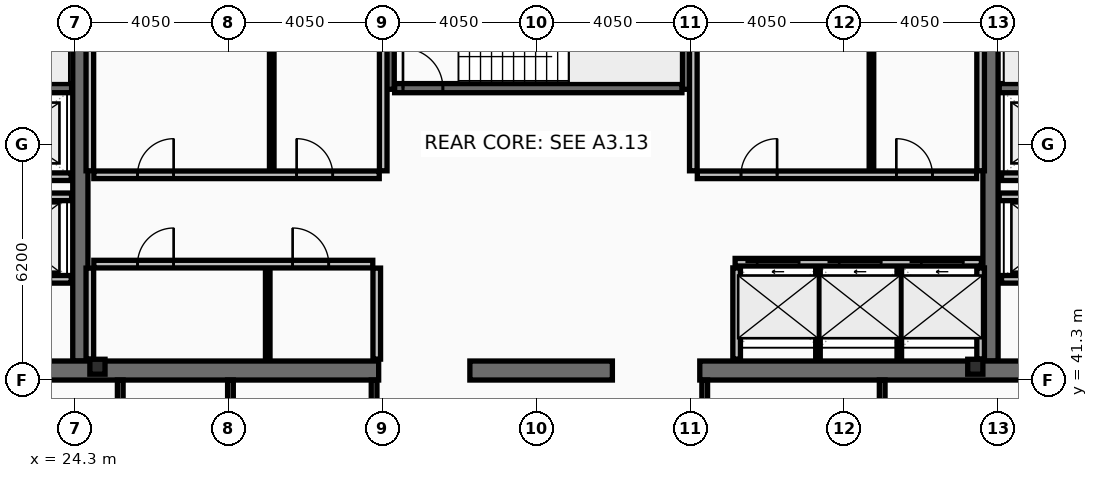
"""IFC4 building model, lengths in metres.
Left out: names, types, materials, properties, quantities, classifications, styles, units other than length and angle.
Written with IfcOpenShell. Run it as: python <this file> out.ifc"""

import sys

from ifc_helpers import new_model, si_unit, direction, frame, frame_2d, origin, origin_2d, place, context, subcontext, project, spatial, rectangle, i_section, extrude, element, fill, save


model = new_model("IFC4")
c1 = context("Model", 3, precision=1e-05, world=origin(), true_north=direction((0.0, 1.0)))
c2 = subcontext(c1, "Body", "Model", "MODEL_VIEW")
j1 = project(units=[si_unit("LENGTHUNIT", "METRE"), si_unit("PLANEANGLEUNIT", "RADIAN")], contexts=[c1])
p1 = place(None, origin())
s1 = spatial("IfcSite", under=j1, at=p1, CompositionType="ELEMENT")
p2 = place(p1, origin())
s2 = spatial("IfcBuilding", under=s1, at=p2, CompositionType="ELEMENT")
p3 = place(p2, frame((0.0, 0.0, 277.0)))
s3 = spatial("IfcBuildingStorey", under=s2, at=p3, CompositionType="ELEMENT", Elevation=277.0)
for number, where, z_axis, x_axis in (
    (1, (24.45, 41.8, 0.0), (0.0, 0.0, 1.0), (0.0, 1.0, 0.0)),
    (2, (48.4, 41.8, 0.0), (0.0, 0.0, 1.0), (0.0, 1.0, 0.0)),
):
    element("IfcWall", number, at=place(p3, frame(where, z_axis=z_axis, x_axis=x_axis)), inside=s3, PredefinedType="SHEAR", context=c2, shape_type="SweptSolid", body=[
        extrude(rectangle(XDim=11.4, YDim=0.4, at=frame_2d((5.7, 0.0))), origin(), (0.0, 0.0, 1.0), 3.44),
    ])
p4 = place(p3, frame((32.3, 41.55, 0.0), z_axis=(0.0, 0.0, 1.0), x_axis=(-1.0, 0.0, 0.0)))
e3 = element("IfcWall", 3, at=p4, inside=s3, PredefinedType="SHEAR", context=c2, shape_type="SweptSolid", body=[
    extrude(rectangle(XDim=11.45, YDim=0.5, at=frame_2d((5.725, 0.0))), origin(), (0.0, 0.0, 1.0), 3.44),
])
p5 = place(p3, frame((38.45, 41.55, 0.0), z_axis=(0.0, 0.0, 1.0), x_axis=(-1.0, 0.0, 0.0)))
e4 = element("IfcWall", 4, at=p5, inside=s3, PredefinedType="SHEAR", context=c2, shape_type="SweptSolid", body=[
    extrude(rectangle(XDim=3.75, YDim=0.5, at=frame_2d((1.875, 0.0))), origin(), (0.0, 0.0, 1.0), 3.44),
])
p6 = place(p3, frame((52.05, 41.55, 0.0), z_axis=(0.0, 0.0, 1.0), x_axis=(-1.0, 0.0, 0.0)))
e5 = element("IfcWall", 5, at=p6, inside=s3, PredefinedType="SHEAR", context=c2, shape_type="SweptSolid", body=[
    extrude(rectangle(XDim=11.3, YDim=0.5, at=frame_2d((5.65, 0.0))), origin(), (0.0, 0.0, 1.0), 3.44),
])
for number, where, z_axis, x_axis in (
    (6, (32.58, 48.95, 0.0), (0.0, 0.0, 1.0), (0.0, 1.0, 0.0)),
    (7, (40.42, 48.95, 0.0), (0.0, 0.0, 1.0), (0.0, 1.0, 0.0)),
):
    element("IfcWall", number, at=place(p3, frame(where, z_axis=z_axis, x_axis=x_axis)), inside=s3, PredefinedType="SHEAR", context=c2, shape_type="SweptSolid", body=[
        extrude(rectangle(XDim=4.25, YDim=0.26, at=frame_2d((2.125, 0.0))), origin(), (0.0, 0.0, 1.0), 3.44),
    ])
p7 = place(p3, frame((16.7, 48.98, 0.0), z_axis=(0.0, 0.0, 1.0), x_axis=(1.0, 0.0, 0.0)))
e8 = element("IfcWall", 8, at=p7, inside=s3, PredefinedType="SHEAR", context=c2, shape_type="SweptSolid", body=[
    extrude(rectangle(XDim=7.52, YDim=0.24, at=frame_2d((3.76, 0.0))), origin(), (0.0, 0.0, 1.0), 3.44),
])
p8 = place(p7, frame((0.22, 0.0, 0.0)))
e9 = element("IfcOpeningElement", 9, at=p8, cuts=e8, PredefinedType="OPENING", context=c2, shape_type="SweptSolid", body=[
    extrude(rectangle(XDim=1.05, YDim=2.15, at=frame_2d((0.525, 1.075))), frame((0.0, 0.13, 0.0), z_axis=(0.0, -1.0, 0.0), x_axis=(1.0, 0.0, 0.0)), (0.0, 0.0, 1.0), 0.26),
])
p9 = place(p3, frame((48.63, 48.98, 0.0), z_axis=(0.0, 0.0, 1.0), x_axis=(1.0, 0.0, 0.0)))
e10 = element("IfcWall", 10, at=p9, inside=s3, PredefinedType="SHEAR", context=c2, shape_type="SweptSolid", body=[
    extrude(rectangle(XDim=7.57, YDim=0.24, at=frame_2d((3.785, 0.0))), origin(), (0.0, 0.0, 1.0), 3.44),
])
p10 = place(p9, frame((6.3, 0.0, 0.0)))
e11 = element("IfcOpeningElement", 11, at=p10, cuts=e10, PredefinedType="OPENING", context=c2, shape_type="SweptSolid", body=[
    extrude(rectangle(XDim=1.05, YDim=2.15, at=frame_2d((0.525, 1.075))), frame((0.0, 0.13, 0.0), z_axis=(0.0, -1.0, 0.0), x_axis=(1.0, 0.0, 0.0)), (0.0, 0.0, 1.0), 0.26),
])
p11 = place(p3, frame((32.72, 48.98, 0.0), z_axis=(0.0, 0.0, 1.0), x_axis=(1.0, 0.0, 0.0)))
e12 = element("IfcWall", 12, at=p11, inside=s3, PredefinedType="SHEAR", context=c2, shape_type="SweptSolid", body=[
    extrude(rectangle(XDim=7.56, YDim=0.24, at=frame_2d((3.78, 0.0))), origin(), (0.0, 0.0, 1.0), 3.44),
])
p12 = place(p11, frame((0.22, 0.0, 0.0)))
e13 = element("IfcOpeningElement", 13, at=p12, cuts=e12, PredefinedType="OPENING", context=c2, shape_type="SweptSolid", body=[
    extrude(rectangle(XDim=1.05, YDim=2.15, at=frame_2d((0.525, 1.075))), frame((0.0, 0.13, 0.0), z_axis=(0.0, -1.0, 0.0), x_axis=(1.0, 0.0, 0.0)), (0.0, 0.0, 1.0), 0.26),
])
for number, where, z_axis, x_axis in (
    (14, (24.9, 41.65, 0.0), (0.0, 0.0, 1.0), (1.0, 0.0, 0.0)),
    (15, (48.0, 41.65, 0.0), (0.0, 0.0, 1.0), (1.0, 0.0, 0.0)),
):
    element("IfcColumn", number, at=place(p3, frame(where, z_axis=z_axis, x_axis=x_axis)), inside=s3, PredefinedType="COLUMN", context=c2, shape_type="SweptSolid", body=[
        extrude(i_section(OverallWidth=0.399, OverallDepth=0.393, WebThickness=0.023, FlangeThickness=0.037, at=origin_2d()), origin(), (0.0, 0.0, 1.0), 3.6),
    ])
p13 = place(p3, frame((41.68, 44.4, 0.0), z_axis=(0.0, 0.0, 1.0), x_axis=(1.0, 0.0, 0.0)))
e16 = element("IfcWall", 16, at=p13, inside=s3, PredefinedType="PARTITIONING", context=c2, shape_type="SweptSolid", body=[
    extrude(rectangle(XDim=6.48, YDim=0.2, at=frame_2d((3.24, 0.0))), origin(), (0.0, 0.0, 1.0), 3.44),
])
p14 = place(p13, frame((0.58, 0.0, 0.0)))
e17 = element("IfcOpeningElement", 17, at=p14, cuts=e16, PredefinedType="OPENING", context=c2, shape_type="SweptSolid", body=[
    extrude(rectangle(XDim=1.1, YDim=2.18, at=frame_2d((0.55, 1.09))), frame((0.0, 0.11, 0.0), z_axis=(0.0, -1.0, 0.0), x_axis=(1.0, 0.0, 0.0)), (0.0, 0.0, 1.0), 0.22),
])
p15 = place(p13, frame((2.74, 0.0, 0.0)))
e18 = element("IfcOpeningElement", 18, at=p15, cuts=e16, PredefinedType="OPENING", context=c2, shape_type="SweptSolid", body=[
    extrude(rectangle(XDim=1.1, YDim=2.18, at=frame_2d((0.55, 1.09))), frame((0.0, 0.11, 0.0), z_axis=(0.0, -1.0, 0.0), x_axis=(1.0, 0.0, 0.0)), (0.0, 0.0, 1.0), 0.22),
])
p16 = place(p13, frame((4.9, 0.0, 0.0)))
e19 = element("IfcOpeningElement", 19, at=p16, cuts=e16, PredefinedType="OPENING", context=c2, shape_type="SweptSolid", body=[
    extrude(rectangle(XDim=1.1, YDim=2.18, at=frame_2d((0.55, 1.09))), frame((0.0, 0.11, 0.0), z_axis=(0.0, -1.0, 0.0), x_axis=(1.0, 0.0, 0.0)), (0.0, 0.0, 1.0), 0.22),
])
p17 = place(p3, frame((51.61, 43.95, 0.0), z_axis=(0.0, 0.0, 1.0), x_axis=(-1.0, 0.0, 0.0)))
e20 = element("IfcWall", 20, at=p17, inside=s3, PredefinedType="PARTITIONING", context=c2, shape_type="SweptSolid", body=[
    extrude(rectangle(XDim=2.92, YDim=0.2, at=frame_2d((1.46, 0.0))), origin(), (0.0, 0.0, 1.0), 3.44),
])
p18 = place(p17, frame((0.81, 0.0, 0.0)))
e21 = element("IfcOpeningElement", 21, at=p18, cuts=e20, PredefinedType="OPENING", context=c2, shape_type="SweptSolid", body=[
    extrude(rectangle(XDim=1.3, YDim=2.18, at=frame_2d((0.65, 1.09))), frame((0.0, 0.11, 0.0), z_axis=(0.0, -1.0, 0.0), x_axis=(1.0, 0.0, 0.0)), (0.0, 0.0, 1.0), 0.22),
])
p19 = place(p3, frame((24.21, 43.95, 0.0), z_axis=(0.0, 0.0, 1.0), x_axis=(-1.0, 0.0, 0.0)))
e22 = element("IfcWall", 22, at=p19, inside=s3, PredefinedType="PARTITIONING", context=c2, shape_type="SweptSolid", body=[
    extrude(rectangle(XDim=2.97, YDim=0.2, at=frame_2d((1.485, 0.0))), origin(), (0.0, 0.0, 1.0), 3.44),
])
p20 = place(p19, frame((0.86, 0.0, 0.0)))
e23 = element("IfcOpeningElement", 23, at=p20, cuts=e22, PredefinedType="OPENING", context=c2, shape_type="SweptSolid", body=[
    extrude(rectangle(XDim=1.3, YDim=2.18, at=frame_2d((0.65, 1.09))), frame((0.0, 0.11, 0.0), z_axis=(0.0, -1.0, 0.0), x_axis=(1.0, 0.0, 0.0)), (0.0, 0.0, 1.0), 0.22),
])
p21 = place(p3, frame((51.61, 46.65, 0.0), z_axis=(0.0, 0.0, 1.0), x_axis=(-1.0, 0.0, 0.0)))
e24 = element("IfcWall", 24, at=p21, inside=s3, PredefinedType="PARTITIONING", context=c2, shape_type="SweptSolid", body=[
    extrude(rectangle(XDim=2.92, YDim=0.2, at=frame_2d((1.46, 0.0))), origin(), (0.0, 0.0, 1.0), 3.44),
])
p22 = place(p21, frame((0.86, 0.0, 0.0)))
e25 = element("IfcOpeningElement", 25, at=p22, cuts=e24, PredefinedType="OPENING", context=c2, shape_type="SweptSolid", body=[
    extrude(rectangle(XDim=1.2, YDim=2.18, at=frame_2d((0.6, 1.09))), frame((0.0, 0.11, 0.0), z_axis=(0.0, -1.0, 0.0), x_axis=(1.0, 0.0, 0.0)), (0.0, 0.0, 1.0), 0.22),
])
p23 = place(p3, frame((24.21, 46.65, 0.0), z_axis=(0.0, 0.0, 1.0), x_axis=(-1.0, 0.0, 0.0)))
e26 = element("IfcWall", 26, at=p23, inside=s3, PredefinedType="PARTITIONING", context=c2, shape_type="SweptSolid", body=[
    extrude(rectangle(XDim=2.97, YDim=0.2, at=frame_2d((1.485, 0.0))), origin(), (0.0, 0.0, 1.0), 3.44),
])
p24 = place(p23, frame((0.91, 0.0, 0.0)))
e27 = element("IfcOpeningElement", 27, at=p24, cuts=e26, PredefinedType="OPENING", context=c2, shape_type="SweptSolid", body=[
    extrude(rectangle(XDim=1.2, YDim=2.18, at=frame_2d((0.6, 1.09))), frame((0.0, 0.11, 0.0), z_axis=(0.0, -1.0, 0.0), x_axis=(1.0, 0.0, 0.0)), (0.0, 0.0, 1.0), 0.22),
])
p25 = place(p3, frame((21.2, 46.12, 0.0), z_axis=(0.0, 0.0, 1.0), x_axis=(1.0, 0.0, 0.0)))
e28 = element("IfcWall", 28, at=p25, inside=s3, PredefinedType="PARTITIONING", context=c2, shape_type="SweptSolid", body=[
    extrude(rectangle(XDim=3.02, YDim=0.2, at=frame_2d((1.51, 0.0))), origin(), (0.0, 0.0, 1.0), 3.44),
])
p26 = place(p3, frame((48.63, 46.12, 0.0), z_axis=(0.0, 0.0, 1.0), x_axis=(1.0, 0.0, 0.0)))
e29 = element("IfcWall", 29, at=p26, inside=s3, PredefinedType="PARTITIONING", context=c2, shape_type="SweptSolid", body=[
    extrude(rectangle(XDim=3.07, YDim=0.2, at=frame_2d((1.535, 0.0))), origin(), (0.0, 0.0, 1.0), 3.44),
])
for number, where, z_axis, x_axis in (
    (30, (24.7, 46.805, 0.0), (0.0, 0.0, 1.0), (0.0, 1.0, 0.0)),
    (31, (32.42, 46.805, 0.0), (0.0, 0.0, 1.0), (0.0, 1.0, 0.0)),
):
    element("IfcWall", number, at=place(p3, frame(where, z_axis=z_axis, x_axis=x_axis)), inside=s3, PredefinedType="PARTITIONING", context=c2, shape_type="SweptSolid", body=[
        extrude(rectangle(XDim=5.99, YDim=0.2, at=frame_2d((2.995, 0.0))), origin(), (0.0, 0.0, 1.0), 3.44),
    ])
p27 = place(p3, frame((29.486, 46.805, 0.0), z_axis=(0.0, 0.0, 1.0), x_axis=(0.0, 1.0, 0.0)))
e32 = element("IfcWall", 32, at=p27, inside=s3, PredefinedType="PARTITIONING", context=c2, shape_type="SweptSolid", body=[
    extrude(rectangle(XDim=5.99, YDim=0.12, at=frame_2d((2.995, 0.0))), origin(), (0.0, 0.0, 1.0), 3.44),
])
p28 = place(p3, frame((24.805, 46.7, 0.0), z_axis=(0.0, 0.0, 1.0), x_axis=(1.0, 0.0, 0.0)))
e33 = element("IfcWall", 33, at=p28, inside=s3, PredefinedType="PARTITIONING", context=c2, shape_type="SweptSolid", body=[
    extrude(rectangle(XDim=7.51, YDim=0.2, at=frame_2d((3.755, 0.0))), origin(), (0.0, 0.0, 1.0), 3.44),
])
p29 = place(p28, frame((1.15, 0.0, 0.0)))
e34 = element("IfcOpeningElement", 34, at=p29, cuts=e33, PredefinedType="OPENING", context=c2, shape_type="SweptSolid", body=[
    extrude(rectangle(XDim=0.95, YDim=2.1, at=frame_2d((0.475, 1.05))), frame((0.0, 0.11, 0.0), z_axis=(0.0, -1.0, 0.0), x_axis=(1.0, 0.0, 0.0)), (0.0, 0.0, 1.0), 0.22),
])
p30 = place(p28, frame((5.336, 0.0, 0.0)))
e35 = element("IfcOpeningElement", 35, at=p30, cuts=e33, PredefinedType="OPENING", context=c2, shape_type="SweptSolid", body=[
    extrude(rectangle(XDim=0.95, YDim=2.1, at=frame_2d((0.475, 1.05))), frame((0.0, 0.11, 0.0), z_axis=(0.0, -1.0, 0.0), x_axis=(1.0, 0.0, 0.0)), (0.0, 0.0, 1.0), 0.22),
])
for number, where, z_axis, x_axis in (
    (36, (24.7, 41.85, 0.0), (0.0, 0.0, 1.0), (0.0, 1.0, 0.0)),
    (37, (32.25, 41.85, 0.0), (0.0, 0.0, 1.0), (0.0, 1.0, 0.0)),
):
    element("IfcWall", number, at=place(p3, frame(where, z_axis=z_axis, x_axis=x_axis)), inside=s3, PredefinedType="PARTITIONING", context=c2, shape_type="SweptSolid", body=[
        extrude(rectangle(XDim=2.395, YDim=0.2, at=frame_2d((1.198, 0.0))), origin(), (0.0, 0.0, 1.0), 3.44),
    ])
p31 = place(p3, frame((29.381, 41.85, 0.0), z_axis=(0.0, 0.0, 1.0), x_axis=(0.0, 1.0, 0.0)))
e38 = element("IfcWall", 38, at=p31, inside=s3, PredefinedType="PARTITIONING", context=c2, shape_type="SweptSolid", body=[
    extrude(rectangle(XDim=2.395, YDim=0.12, at=frame_2d((1.198, 0.0))), origin(), (0.0, 0.0, 1.0), 3.44),
])
p32 = place(p3, frame((24.805, 44.35, 0.0), z_axis=(0.0, 0.0, 1.0), x_axis=(1.0, 0.0, 0.0)))
e39 = element("IfcWall", 39, at=p32, inside=s3, PredefinedType="PARTITIONING", context=c2, shape_type="SweptSolid", body=[
    extrude(rectangle(XDim=7.34, YDim=0.2, at=frame_2d((3.67, 0.0))), origin(), (0.0, 0.0, 1.0), 3.44),
])
p33 = place(p32, frame((1.15, 0.0, 0.0)))
e40 = element("IfcOpeningElement", 40, at=p33, cuts=e39, PredefinedType="OPENING", context=c2, shape_type="SweptSolid", body=[
    extrude(rectangle(XDim=0.95, YDim=2.1, at=frame_2d((0.475, 1.05))), frame((0.0, 0.11, 0.0), z_axis=(0.0, -1.0, 0.0), x_axis=(1.0, 0.0, 0.0)), (0.0, 0.0, 1.0), 0.22),
])
p34 = place(p32, frame((5.231, 0.0, 0.0)))
e41 = element("IfcOpeningElement", 41, at=p34, cuts=e39, PredefinedType="OPENING", context=c2, shape_type="SweptSolid", body=[
    extrude(rectangle(XDim=0.95, YDim=2.1, at=frame_2d((0.475, 1.05))), frame((0.0, 0.11, 0.0), z_axis=(0.0, -1.0, 0.0), x_axis=(1.0, 0.0, 0.0)), (0.0, 0.0, 1.0), 0.22),
])
for number, where, z_axis, x_axis in (
    (42, (40.58, 46.805, 0.0), (0.0, 0.0, 1.0), (0.0, 1.0, 0.0)),
    (43, (48.14, 46.805, 0.0), (0.0, 0.0, 1.0), (0.0, 1.0, 0.0)),
):
    element("IfcWall", number, at=place(p3, frame(where, z_axis=z_axis, x_axis=x_axis)), inside=s3, PredefinedType="PARTITIONING", context=c2, shape_type="SweptSolid", body=[
        extrude(rectangle(XDim=5.99, YDim=0.2, at=frame_2d((2.995, 0.0))), origin(), (0.0, 0.0, 1.0), 3.44),
    ])
p35 = place(p3, frame((45.267, 46.805, 0.0), z_axis=(0.0, 0.0, 1.0), x_axis=(0.0, 1.0, 0.0)))
e44 = element("IfcWall", 44, at=p35, inside=s3, PredefinedType="PARTITIONING", context=c2, shape_type="SweptSolid", body=[
    extrude(rectangle(XDim=5.99, YDim=0.12, at=frame_2d((2.995, 0.0))), origin(), (0.0, 0.0, 1.0), 3.44),
])
p36 = place(p3, frame((40.685, 46.7, 0.0), z_axis=(0.0, 0.0, 1.0), x_axis=(1.0, 0.0, 0.0)))
e45 = element("IfcWall", 45, at=p36, inside=s3, PredefinedType="PARTITIONING", context=c2, shape_type="SweptSolid", body=[
    extrude(rectangle(XDim=7.35, YDim=0.2, at=frame_2d((3.675, 0.0))), origin(), (0.0, 0.0, 1.0), 3.44),
])
p37 = place(p36, frame((1.15, 0.0, 0.0)))
e46 = element("IfcOpeningElement", 46, at=p37, cuts=e45, PredefinedType="OPENING", context=c2, shape_type="SweptSolid", body=[
    extrude(rectangle(XDim=0.95, YDim=2.1, at=frame_2d((0.475, 1.05))), frame((0.0, 0.11, 0.0), z_axis=(0.0, -1.0, 0.0), x_axis=(1.0, 0.0, 0.0)), (0.0, 0.0, 1.0), 0.22),
])
p38 = place(p36, frame((5.237, 0.0, 0.0)))
e47 = element("IfcOpeningElement", 47, at=p38, cuts=e45, PredefinedType="OPENING", context=c2, shape_type="SweptSolid", body=[
    extrude(rectangle(XDim=0.95, YDim=2.1, at=frame_2d((0.475, 1.05))), frame((0.0, 0.11, 0.0), z_axis=(0.0, -1.0, 0.0), x_axis=(1.0, 0.0, 0.0)), (0.0, 0.0, 1.0), 0.22),
])
for number, where, z_axis, x_axis in (
    (48, (41.72, 41.85, 0.0), (0.0, 0.0, 1.0), (0.0, 1.0, 0.0)),
    (49, (48.14, 41.85, 0.0), (0.0, 0.0, 1.0), (0.0, 1.0, 0.0)),
):
    element("IfcWall", number, at=place(p3, frame(where, z_axis=z_axis, x_axis=x_axis)), inside=s3, PredefinedType="PARTITIONING", context=c2, shape_type="SweptSolid", body=[
        extrude(rectangle(XDim=2.4, YDim=0.2, at=frame_2d((1.2, 0.0))), origin(), (0.0, 0.0, 1.0), 3.44),
    ])
for number, where, z_axis, x_axis in (
    (50, (43.86, 41.85, 0.0), (0.0, 0.0, 1.0), (0.0, 1.0, 0.0)),
    (51, (46.0, 41.85, 0.0), (0.0, 0.0, 1.0), (0.0, 1.0, 0.0)),
):
    element("IfcWall", number, at=place(p3, frame(where, z_axis=z_axis, x_axis=x_axis)), inside=s3, PredefinedType="PARTITIONING", context=c2, shape_type="SweptSolid", body=[
        extrude(rectangle(XDim=2.4, YDim=0.12, at=frame_2d((1.2, 0.0))), origin(), (0.0, 0.0, 1.0), 3.44),
    ])
for number, where, z_axis, x_axis in (
    (52, (25.5, 38.28, 0.0), (0.0, 0.0, 1.0), (0.0, 1.0, 0.0)),
    (53, (28.4, 38.28, 0.0), (0.0, 0.0, 1.0), (0.0, 1.0, 0.0)),
    (54, (32.18, 38.28, 0.0), (0.0, 0.0, 1.0), (0.0, 1.0, 0.0)),
    (55, (40.88, 38.28, 0.0), (0.0, 0.0, 1.0), (0.0, 1.0, 0.0)),
    (56, (45.55, 38.28, 0.0), (0.0, 0.0, 1.0), (0.0, 1.0, 0.0)),
):
    element("IfcWall", number, at=place(p3, frame(where, z_axis=z_axis, x_axis=x_axis)), inside=s3, PredefinedType="PARTITIONING", context=c2, shape_type="SweptSolid", body=[
        extrude(rectangle(XDim=3.02, YDim=0.15, at=frame_2d((1.51, 0.0))), origin(), (0.0, 0.0, 1.0), 3.44),
    ])
p39 = place(p12, origin())
e57 = element("IfcDoor", 57, at=p39, inside=s3, OperationType="SINGLE_SWING_LEFT", PredefinedType="DOOR", context=c2, shape_type="SweptSolid", body=[
    extrude(rectangle(XDim=1.05, YDim=2.15, at=frame_2d((0.525, 1.075))), frame((0.0, 0.025, 0.0), z_axis=(0.0, -1.0, 0.0), x_axis=(1.0, 0.0, 0.0)), (0.0, 0.0, 1.0), 0.05),
])
fill(e13, e57)
p40 = place(p14, origin())
e58 = element("IfcDoor", 58, at=p40, inside=s3, OperationType="SLIDING_TO_LEFT", PredefinedType="DOOR", context=c2, shape_type="SweptSolid", body=[
    extrude(rectangle(XDim=1.1, YDim=2.18, at=frame_2d((0.55, 1.09))), frame((0.0, 0.025, 0.0), z_axis=(0.0, -1.0, 0.0), x_axis=(1.0, 0.0, 0.0)), (0.0, 0.0, 1.0), 0.05),
])
fill(e17, e58)
p41 = place(p15, origin())
e59 = element("IfcDoor", 59, at=p41, inside=s3, OperationType="SLIDING_TO_LEFT", PredefinedType="DOOR", context=c2, shape_type="SweptSolid", body=[
    extrude(rectangle(XDim=1.1, YDim=2.18, at=frame_2d((0.55, 1.09))), frame((0.0, 0.025, 0.0), z_axis=(0.0, -1.0, 0.0), x_axis=(1.0, 0.0, 0.0)), (0.0, 0.0, 1.0), 0.05),
])
fill(e18, e59)
p42 = place(p16, origin())
e60 = element("IfcDoor", 60, at=p42, inside=s3, OperationType="SLIDING_TO_LEFT", PredefinedType="DOOR", context=c2, shape_type="SweptSolid", body=[
    extrude(rectangle(XDim=1.1, YDim=2.18, at=frame_2d((0.55, 1.09))), frame((0.0, 0.025, 0.0), z_axis=(0.0, -1.0, 0.0), x_axis=(1.0, 0.0, 0.0)), (0.0, 0.0, 1.0), 0.05),
])
fill(e19, e60)
p43 = place(p29, origin())
e61 = element("IfcDoor", 61, at=p43, inside=s3, OperationType="SINGLE_SWING_RIGHT", PredefinedType="DOOR", context=c2, shape_type="SweptSolid", body=[
    extrude(rectangle(XDim=0.95, YDim=2.1, at=frame_2d((0.475, 1.05))), frame((0.0, 0.025, 0.0), z_axis=(0.0, -1.0, 0.0), x_axis=(1.0, 0.0, 0.0)), (0.0, 0.0, 1.0), 0.05),
])
fill(e34, e61)
p44 = place(p30, origin())
e62 = element("IfcDoor", 62, at=p44, inside=s3, OperationType="SINGLE_SWING_LEFT", PredefinedType="DOOR", context=c2, shape_type="SweptSolid", body=[
    extrude(rectangle(XDim=0.95, YDim=2.1, at=frame_2d((0.475, 1.05))), frame((0.0, 0.025, 0.0), z_axis=(0.0, -1.0, 0.0), x_axis=(1.0, 0.0, 0.0)), (0.0, 0.0, 1.0), 0.05),
])
fill(e35, e62)
p45 = place(p33, origin())
e63 = element("IfcDoor", 63, at=p45, inside=s3, OperationType="SINGLE_SWING_RIGHT", PredefinedType="DOOR", context=c2, shape_type="SweptSolid", body=[
    extrude(rectangle(XDim=0.95, YDim=2.1, at=frame_2d((0.475, 1.05))), frame((0.0, 0.025, 0.0), z_axis=(0.0, -1.0, 0.0), x_axis=(1.0, 0.0, 0.0)), (0.0, 0.0, 1.0), 0.05),
])
fill(e40, e63)
p46 = place(p34, origin())
e64 = element("IfcDoor", 64, at=p46, inside=s3, OperationType="SINGLE_SWING_LEFT", PredefinedType="DOOR", context=c2, shape_type="SweptSolid", body=[
    extrude(rectangle(XDim=0.95, YDim=2.1, at=frame_2d((0.475, 1.05))), frame((0.0, 0.025, 0.0), z_axis=(0.0, -1.0, 0.0), x_axis=(1.0, 0.0, 0.0)), (0.0, 0.0, 1.0), 0.05),
])
fill(e41, e64)
p47 = place(p37, origin())
e65 = element("IfcDoor", 65, at=p47, inside=s3, OperationType="SINGLE_SWING_RIGHT", PredefinedType="DOOR", context=c2, shape_type="SweptSolid", body=[
    extrude(rectangle(XDim=0.95, YDim=2.1, at=frame_2d((0.475, 1.05))), frame((0.0, 0.025, 0.0), z_axis=(0.0, -1.0, 0.0), x_axis=(1.0, 0.0, 0.0)), (0.0, 0.0, 1.0), 0.05),
])
fill(e46, e65)
p48 = place(p38, origin())
e66 = element("IfcDoor", 66, at=p48, inside=s3, OperationType="SINGLE_SWING_LEFT", PredefinedType="DOOR", context=c2, shape_type="SweptSolid", body=[
    extrude(rectangle(XDim=0.95, YDim=2.1, at=frame_2d((0.475, 1.05))), frame((0.0, 0.025, 0.0), z_axis=(0.0, -1.0, 0.0), x_axis=(1.0, 0.0, 0.0)), (0.0, 0.0, 1.0), 0.05),
])
fill(e47, e66)
save(model, sys.argv[1])
